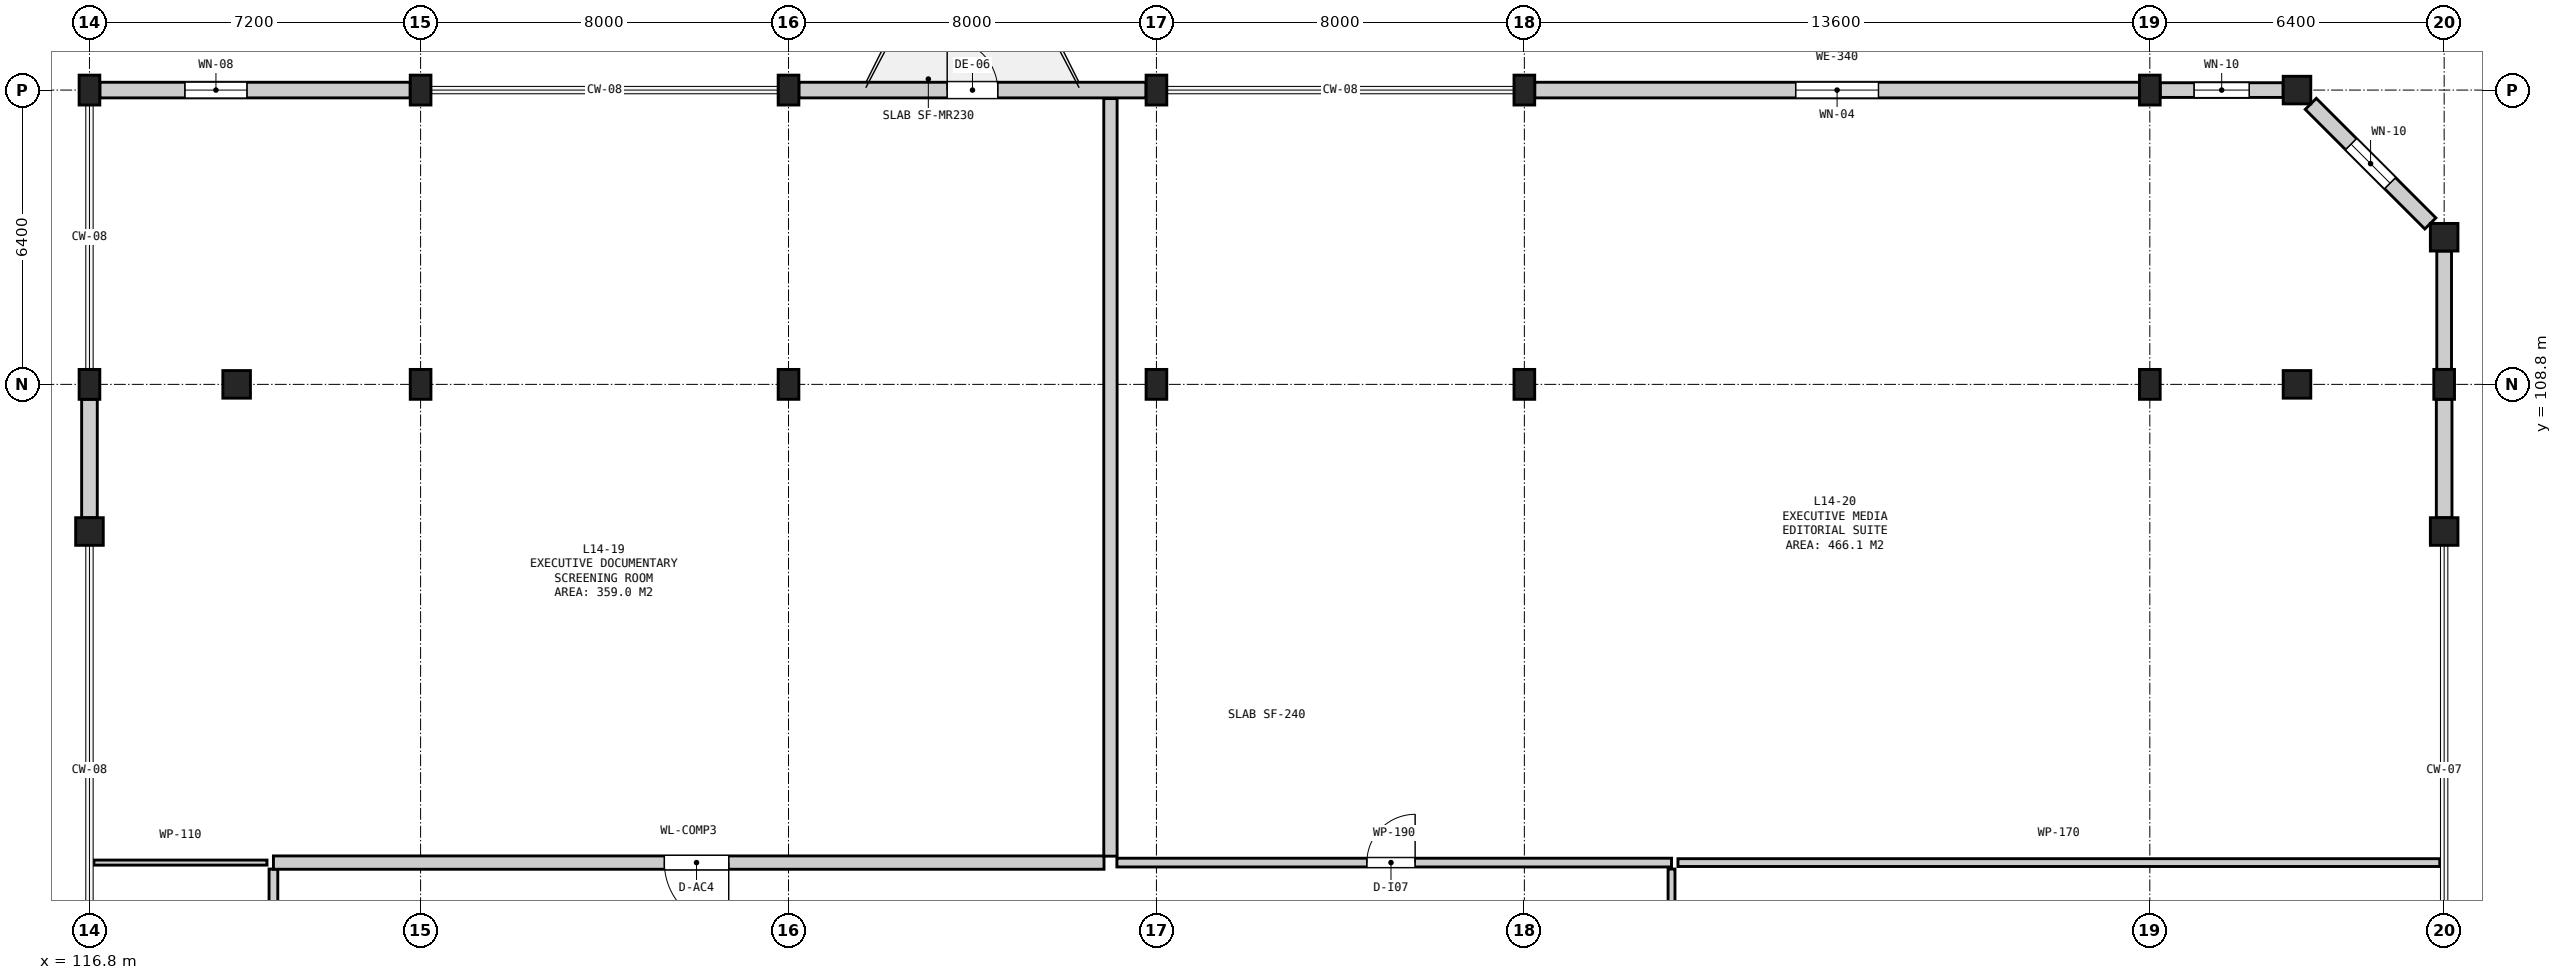
"""IFC4 building model, lengths in metres.
Left out: names, types, materials, properties, quantities, classifications, styles, units other than length and angle.
Written with IfcOpenShell. Run it as: python <this file> out.ifc"""

import sys

from ifc_helpers import new_model, si_unit, direction, frame, frame_2d, origin, origin_2d, place, context, subcontext, project, spatial, rectangle, circle, extrude, element, fill, save


model = new_model("IFC4")
c1 = context("Model", 3, precision=1e-05, world=origin(), true_north=direction((0.0, 1.0)))
c2 = subcontext(c1, "Body", "Model", "MODEL_VIEW")
j1 = project(units=[si_unit("LENGTHUNIT", "METRE"), si_unit("PLANEANGLEUNIT", "RADIAN")], contexts=[c1])
p1 = place(None, origin())
s1 = spatial("IfcSite", under=j1, at=p1, CompositionType="ELEMENT")
p2 = place(p1, origin())
s2 = spatial("IfcBuilding", under=s1, at=p2, CompositionType="ELEMENT")
p3 = place(p2, frame((0.0, 0.0, 58.7)))
s3 = spatial("IfcBuildingStorey", under=s2, at=p3, CompositionType="ELEMENT", Elevation=58.7)
p4 = place(p3, frame((116.8, 105.6, 0.0), z_axis=(0.0, 0.0, 1.0), x_axis=(1.0, 0.0, 0.0)))
e1 = element("IfcColumn", 1, at=p4, inside=s3, PredefinedType="COLUMN", context=c2, shape_type="SweptSolid", body=[
    extrude(circle(Radius=0.3, at=origin_2d()), origin(), (0.0, 0.0, 1.0), 3.95),
])
for number, where, z_axis, x_axis in (
    (2, (116.8, 108.8, 0.0), (0.0, 0.0, 1.0), (1.0, 0.0, 0.0)),
    (3, (116.8, 115.2, 0.0), (0.0, 0.0, 1.0), (1.0, 0.0, 0.0)),
):
    element("IfcColumn", number, at=place(p3, frame(where, z_axis=z_axis, x_axis=x_axis)), inside=s3, PredefinedType="COLUMN", context=c2, shape_type="SweptSolid", body=[
        extrude(rectangle(XDim=0.45, YDim=0.65, at=origin_2d()), origin(), (0.0, 0.0, 1.0), 3.95),
    ])
p5 = place(p3, frame((120.0, 108.8, 0.0), z_axis=(0.0, 0.0, 1.0), x_axis=(1.0, 0.0, 0.0)))
e4 = element("IfcColumn", 4, at=p5, inside=s3, PredefinedType="COLUMN", context=c2, shape_type="SweptSolid", body=[
    extrude(circle(Radius=0.3, at=origin_2d()), origin(), (0.0, 0.0, 1.0), 3.95),
])
for number, where, z_axis, x_axis in (
    (5, (124.0, 108.8, 0.0), (0.0, 0.0, 1.0), (1.0, 0.0, 0.0)),
    (6, (124.0, 115.2, 0.0), (0.0, 0.0, 1.0), (1.0, 0.0, 0.0)),
    (7, (132.0, 108.8, 0.0), (0.0, 0.0, 1.0), (1.0, 0.0, 0.0)),
    (8, (132.0, 115.2, 0.0), (0.0, 0.0, 1.0), (1.0, 0.0, 0.0)),
    (9, (140.0, 108.8, 0.0), (0.0, 0.0, 1.0), (1.0, 0.0, 0.0)),
    (10, (140.0, 115.2, 0.0), (0.0, 0.0, 1.0), (1.0, 0.0, 0.0)),
    (11, (148.0, 108.8, 0.0), (0.0, 0.0, 1.0), (1.0, 0.0, 0.0)),
    (12, (148.0, 115.2, 0.0), (0.0, 0.0, 1.0), (1.0, 0.0, 0.0)),
    (13, (161.6, 108.8, 0.0), (0.0, 0.0, 1.0), (1.0, 0.0, 0.0)),
    (14, (161.6, 115.2, 0.0), (0.0, 0.0, 1.0), (1.0, 0.0, 0.0)),
):
    element("IfcColumn", number, at=place(p3, frame(where, z_axis=z_axis, x_axis=x_axis)), inside=s3, PredefinedType="COLUMN", context=c2, shape_type="SweptSolid", body=[
        extrude(rectangle(XDim=0.45, YDim=0.65, at=origin_2d()), origin(), (0.0, 0.0, 1.0), 3.95),
    ])
for number, where, z_axis, x_axis in (
    (15, (164.8, 108.8, 0.0), (0.0, 0.0, 1.0), (1.0, 0.0, 0.0)),
    (16, (164.8, 115.2, 0.0), (0.0, 0.0, 1.0), (1.0, 0.0, 0.0)),
    (17, (168.0, 105.6, 0.0), (0.0, 0.0, 1.0), (1.0, 0.0, 0.0)),
):
    element("IfcColumn", number, at=place(p3, frame(where, z_axis=z_axis, x_axis=x_axis)), inside=s3, PredefinedType="COLUMN", context=c2, shape_type="SweptSolid", body=[
        extrude(circle(Radius=0.3, at=origin_2d()), origin(), (0.0, 0.0, 1.0), 3.95),
    ])
p6 = place(p3, frame((168.0, 108.8, 0.0), z_axis=(0.0, 0.0, 1.0), x_axis=(1.0, 0.0, 0.0)))
e18 = element("IfcColumn", 18, at=p6, inside=s3, PredefinedType="COLUMN", context=c2, shape_type="SweptSolid", body=[
    extrude(rectangle(XDim=0.45, YDim=0.65, at=origin_2d()), origin(), (0.0, 0.0, 1.0), 3.95),
])
p7 = place(p3, frame((168.0, 112.0, 0.0), z_axis=(0.0, 0.0, 1.0), x_axis=(1.0, 0.0, 0.0)))
e19 = element("IfcColumn", 19, at=p7, inside=s3, PredefinedType="COLUMN", context=c2, shape_type="SweptSolid", body=[
    extrude(circle(Radius=0.3, at=origin_2d()), origin(), (0.0, 0.0, 1.0), 3.95),
])
p8 = place(p3, frame((168.0, 105.9, 0.0), z_axis=(0.0, 0.0, 1.0), x_axis=(0.0, 1.0, 0.0)))
e20 = element("IfcWall", 20, at=p8, inside=s3, PredefinedType="SOLIDWALL", context=c2, shape_type="SweptSolid", body=[
    extrude(rectangle(XDim=2.575, YDim=0.34, at=frame_2d((1.288, 0.0))), origin(), (0.0, 0.0, 1.0), 2.635),
])
p9 = place(p3, frame((168.0, 109.125, 0.0), z_axis=(0.0, 0.0, 1.0), x_axis=(0.0, 1.0, 0.0)))
e21 = element("IfcWall", 21, at=p9, inside=s3, PredefinedType="SOLIDWALL", context=c2, shape_type="SweptSolid", body=[
    extrude(rectangle(XDim=2.575, YDim=0.32, at=frame_2d((1.288, 0.0))), origin(), (0.0, 0.0, 1.0), 3.05),
])
p10 = place(p3, frame((167.7, 112.3, 0.0), z_axis=(0.0, 0.0, 1.0), x_axis=(-0.707106781187, 0.707106781187, 0.0)))
e22 = element("IfcWall", 22, at=p10, inside=s3, PredefinedType="SOLIDWALL", context=c2, shape_type="SweptSolid", body=[
    extrude(rectangle(XDim=3.677, YDim=0.34, at=frame_2d((1.838, 0.0))), origin(), (0.0, 0.0, 1.0), 3.045),
])
p11 = place(p10, frame((1.239, 0.0, 0.9)))
e23 = element("IfcOpeningElement", 23, at=p11, cuts=e22, PredefinedType="OPENING", context=c2, shape_type="SweptSolid", body=[
    extrude(rectangle(XDim=1.2, YDim=1.7, at=frame_2d((0.6, 0.85))), frame((0.0, 0.182, 0.0), z_axis=(0.0, -1.0, 0.0), x_axis=(1.0, 0.0, 0.0)), (0.0, 0.0, 1.0), 0.364),
])
p12 = place(p3, frame((164.5, 115.2, 0.0), z_axis=(0.0, 0.0, 1.0), x_axis=(-1.0, 0.0, 0.0)))
e24 = element("IfcWall", 24, at=p12, inside=s3, PredefinedType="SOLIDWALL", context=c2, shape_type="SweptSolid", body=[
    extrude(rectangle(XDim=2.675, YDim=0.32, at=frame_2d((1.337, 0.0))), origin(), (0.0, 0.0, 1.0), 3.05),
])
p13 = place(p12, frame((0.738, 0.0, 0.9)))
e25 = element("IfcOpeningElement", 25, at=p13, cuts=e24, PredefinedType="OPENING", context=c2, shape_type="SweptSolid", body=[
    extrude(rectangle(XDim=1.2, YDim=1.7, at=frame_2d((0.6, 0.85))), frame((0.0, 0.172, 0.0), z_axis=(0.0, -1.0, 0.0), x_axis=(1.0, 0.0, 0.0)), (0.0, 0.0, 1.0), 0.344),
])
p14 = place(p3, frame((161.375, 115.2, 0.0), z_axis=(0.0, 0.0, 1.0), x_axis=(-1.0, 0.0, 0.0)))
e26 = element("IfcWall", 26, at=p14, inside=s3, PredefinedType="SOLIDWALL", context=c2, shape_type="SweptSolid", body=[
    extrude(rectangle(XDim=13.15, YDim=0.34, at=frame_2d((6.575, 0.0))), origin(), (0.0, 0.0, 1.0), 3.035),
])
p15 = place(p14, frame((5.675, 0.0, 0.9)))
e27 = element("IfcOpeningElement", 27, at=p15, cuts=e26, PredefinedType="OPENING", context=c2, shape_type="SweptSolid", body=[
    extrude(rectangle(XDim=1.8, YDim=1.85, at=frame_2d((0.9, 0.925))), frame((0.0, 0.182, 0.0), z_axis=(0.0, -1.0, 0.0), x_axis=(1.0, 0.0, 0.0)), (0.0, 0.0, 1.0), 0.364),
])
p16 = place(p3, frame((139.775, 115.2, 0.0), z_axis=(0.0, 0.0, 1.0), x_axis=(-1.0, 0.0, 0.0)))
e28 = element("IfcWall", 28, at=p16, inside=s3, PredefinedType="SOLIDWALL", context=c2, shape_type="SweptSolid", body=[
    extrude(rectangle(XDim=7.55, YDim=0.34, at=frame_2d((3.775, 0.0))), origin(), (0.0, 0.0, 1.0), 3.05),
])
p17 = place(p16, frame((3.225, 0.0, 0.0)))
e29 = element("IfcOpeningElement", 29, at=p17, cuts=e28, PredefinedType="OPENING", context=c2, shape_type="SweptSolid", body=[
    extrude(rectangle(XDim=1.1, YDim=2.2, at=frame_2d((0.55, 1.1))), frame((0.0, 0.182, 0.0), z_axis=(0.0, -1.0, 0.0), x_axis=(1.0, 0.0, 0.0)), (0.0, 0.0, 1.0), 0.364),
])
p18 = place(p3, frame((123.775, 115.2, 0.0), z_axis=(0.0, 0.0, 1.0), x_axis=(-1.0, 0.0, 0.0)))
e30 = element("IfcWall", 30, at=p18, inside=s3, PredefinedType="SOLIDWALL", context=c2, shape_type="SweptSolid", body=[
    extrude(rectangle(XDim=6.75, YDim=0.34, at=frame_2d((3.375, 0.0))), origin(), (0.0, 0.0, 1.0), 3.035),
])
p19 = place(p18, frame((3.55, 0.0, 0.9)))
e31 = element("IfcOpeningElement", 31, at=p19, cuts=e30, PredefinedType="OPENING", context=c2, shape_type="SweptSolid", body=[
    extrude(rectangle(XDim=1.35, YDim=1.75, at=frame_2d((0.675, 0.875))), frame((0.0, 0.182, 0.0), z_axis=(0.0, -1.0, 0.0), x_axis=(1.0, 0.0, 0.0)), (0.0, 0.0, 1.0), 0.364),
])
p20 = place(p3, frame((116.8, 108.475, 0.0), z_axis=(0.0, 0.0, 1.0), x_axis=(0.0, -1.0, 0.0)))
e32 = element("IfcWall", 32, at=p20, inside=s3, PredefinedType="SOLIDWALL", context=c2, shape_type="SweptSolid", body=[
    extrude(rectangle(XDim=2.575, YDim=0.34, at=frame_2d((1.288, 0.0))), origin(), (0.0, 0.0, 1.0), 2.635),
])
p21 = place(p3, frame((151.34, 98.4, 0.0), z_axis=(0.0, 0.0, 1.0), x_axis=(1.0, 0.0, 0.0)))
e33 = element("IfcWall", 33, at=p21, inside=s3, PredefinedType="PARTITIONING", context=c2, shape_type="SweptSolid", body=[
    extrude(rectangle(XDim=16.565, YDim=0.17, at=frame_2d((8.282, 0.0))), origin(), (0.0, 0.0, 1.0), 3.67),
])
p22 = place(p3, frame((151.2, 76.0, 0.0), z_axis=(0.0, 0.0, 1.0), x_axis=(0.0, 1.0, 0.0)))
e34 = element("IfcWall", 34, at=p22, inside=s3, PredefinedType="PARTITIONING", context=c2, shape_type="SweptSolid", body=[
    extrude(rectangle(XDim=22.26, YDim=0.15, at=frame_2d((11.13, 0.0))), origin(), (0.0, 0.0, 1.0), 3.67),
])
p23 = place(p22, frame((6.675, 0.0, 0.0)))
e35 = element("IfcOpeningElement", 35, at=p23, cuts=e34, PredefinedType="OPENING", context=c2, shape_type="SweptSolid", body=[
    extrude(rectangle(XDim=1.05, YDim=2.15, at=frame_2d((0.525, 1.075))), frame((0.0, 0.087, 0.0), z_axis=(0.0, -1.0, 0.0), x_axis=(1.0, 0.0, 0.0)), (0.0, 0.0, 1.0), 0.174),
])
p24 = place(p3, frame((116.895, 98.4, 0.0), z_axis=(0.0, 0.0, 1.0), x_axis=(1.0, 0.0, 0.0)))
e36 = element("IfcWall", 36, at=p24, inside=s3, PredefinedType="PARTITIONING", context=c2, shape_type="SweptSolid", body=[
    extrude(rectangle(XDim=3.765, YDim=0.11, at=frame_2d((1.882, 0.0))), origin(), (0.0, 0.0, 1.0), 3.67),
])
p25 = place(p3, frame((120.8, 76.14, 0.0), z_axis=(0.0, 0.0, 1.0), x_axis=(0.0, 1.0, 0.0)))
e37 = element("IfcWall", 37, at=p25, inside=s3, PredefinedType="PARTITIONING", context=c2, shape_type="SweptSolid", body=[
    extrude(rectangle(XDim=22.12, YDim=0.19, at=frame_2d((11.06, 0.0))), origin(), (0.0, 0.0, 1.0), 3.67),
])
p26 = place(p25, frame((6.535, 0.0, 0.0)))
e38 = element("IfcOpeningElement", 38, at=p26, cuts=e37, PredefinedType="OPENING", context=c2, shape_type="SweptSolid", body=[
    extrude(rectangle(XDim=1.05, YDim=2.15, at=frame_2d((0.525, 1.075))), frame((0.0, 0.107, 0.0), z_axis=(0.0, -1.0, 0.0), x_axis=(1.0, 0.0, 0.0)), (0.0, 0.0, 1.0), 0.214),
])
p27 = place(p3, frame((120.8, 98.4, 0.0), z_axis=(0.0, 0.0, 1.0), x_axis=(1.0, 0.0, 0.0)))
e39 = element("IfcWall", 39, at=p27, inside=s3, PredefinedType="SOLIDWALL", context=c2, shape_type="SweptSolid", body=[
    extrude(rectangle(XDim=18.06, YDim=0.29, at=frame_2d((9.03, 0.0))), origin(), (0.0, 0.0, 1.0), 3.67),
])
p28 = place(p27, frame((8.5, 0.0, 0.0)))
e40 = element("IfcOpeningElement", 40, at=p28, cuts=e39, PredefinedType="OPENING", context=c2, shape_type="SweptSolid", body=[
    extrude(rectangle(XDim=1.4, YDim=2.2, at=frame_2d((0.7, 1.1))), frame((0.0, 0.157, 0.0), z_axis=(0.0, -1.0, 0.0), x_axis=(1.0, 0.0, 0.0)), (0.0, 0.0, 1.0), 0.314),
])
p29 = place(p3, frame((139.0, 98.54, 0.0), z_axis=(0.0, 0.0, 1.0), x_axis=(0.0, 1.0, 0.0)))
e41 = element("IfcWall", 41, at=p29, inside=s3, PredefinedType="SOLIDWALL", context=c2, shape_type="SweptSolid", body=[
    extrude(rectangle(XDim=16.475, YDim=0.29, at=frame_2d((8.237, 0.0))), origin(), (0.0, 0.0, 1.0), 3.67),
])
p30 = place(p3, frame((139.14, 98.4, 0.0), z_axis=(0.0, 0.0, 1.0), x_axis=(1.0, 0.0, 0.0)))
e42 = element("IfcWall", 42, at=p30, inside=s3, PredefinedType="PARTITIONING", context=c2, shape_type="SweptSolid", body=[
    extrude(rectangle(XDim=12.06, YDim=0.19, at=frame_2d((6.03, 0.0))), origin(), (0.0, 0.0, 1.0), 3.67),
])
p31 = place(p30, frame((5.435, 0.0, 0.0)))
e43 = element("IfcOpeningElement", 43, at=p31, cuts=e42, PredefinedType="OPENING", context=c2, shape_type="SweptSolid", body=[
    extrude(rectangle(XDim=1.05, YDim=2.15, at=frame_2d((0.525, 1.075))), frame((0.0, 0.107, 0.0), z_axis=(0.0, -1.0, 0.0), x_axis=(1.0, 0.0, 0.0)), (0.0, 0.0, 1.0), 0.214),
])
p32 = place(p11, origin())
e44 = element("IfcWindow", 44, at=p32, inside=s3, PartitioningType="SINGLE_PANEL", PredefinedType="WINDOW", context=c2, shape_type="SweptSolid", body=[
    extrude(rectangle(XDim=1.2, YDim=1.7, at=frame_2d((0.6, 0.85))), frame((0.0, 0.03, 0.0), z_axis=(0.0, -1.0, 0.0), x_axis=(1.0, 0.0, 0.0)), (0.0, 0.0, 1.0), 0.06),
])
fill(e23, e44)
p33 = place(p13, origin())
e45 = element("IfcWindow", 45, at=p33, inside=s3, PartitioningType="SINGLE_PANEL", PredefinedType="WINDOW", context=c2, shape_type="SweptSolid", body=[
    extrude(rectangle(XDim=1.2, YDim=1.7, at=frame_2d((0.6, 0.85))), frame((0.0, 0.03, 0.0), z_axis=(0.0, -1.0, 0.0), x_axis=(1.0, 0.0, 0.0)), (0.0, 0.0, 1.0), 0.06),
])
fill(e25, e45)
p34 = place(p15, origin())
e46 = element("IfcWindow", 46, at=p34, inside=s3, PartitioningType="DOUBLE_PANEL_VERTICAL", PredefinedType="WINDOW", context=c2, shape_type="SweptSolid", body=[
    extrude(rectangle(XDim=1.8, YDim=1.85, at=frame_2d((0.9, 0.925))), frame((0.0, 0.03, 0.0), z_axis=(0.0, -1.0, 0.0), x_axis=(1.0, 0.0, 0.0)), (0.0, 0.0, 1.0), 0.06),
])
fill(e27, e46)
p35 = place(p17, frame((1.1, 0.0, 0.0), z_axis=(0.0, 0.0, 1.0), x_axis=(-1.0, 0.0, 0.0)))
e47 = element("IfcDoor", 47, at=p35, inside=s3, OperationType="SINGLE_SWING_LEFT", PredefinedType="DOOR", context=c2, shape_type="SweptSolid", body=[
    extrude(rectangle(XDim=1.1, YDim=2.2, at=frame_2d((0.55, 1.1))), frame((0.0, 0.025, 0.0), z_axis=(0.0, -1.0, 0.0), x_axis=(1.0, 0.0, 0.0)), (0.0, 0.0, 1.0), 0.05),
])
fill(e29, e47)
p36 = place(p19, origin())
e48 = element("IfcWindow", 48, at=p36, inside=s3, PartitioningType="SINGLE_PANEL", PredefinedType="WINDOW", context=c2, shape_type="SweptSolid", body=[
    extrude(rectangle(XDim=1.35, YDim=1.75, at=frame_2d((0.675, 0.875))), frame((0.0, 0.03, 0.0), z_axis=(0.0, -1.0, 0.0), x_axis=(1.0, 0.0, 0.0)), (0.0, 0.0, 1.0), 0.06),
])
fill(e31, e48)
p37 = place(p28, frame((1.4, 0.0, 0.0), z_axis=(0.0, 0.0, 1.0), x_axis=(-1.0, 0.0, 0.0)))
e49 = element("IfcDoor", 49, at=p37, inside=s3, OperationType="SINGLE_SWING_LEFT", PredefinedType="DOOR", context=c2, shape_type="SweptSolid", body=[
    extrude(rectangle(XDim=1.4, YDim=2.2, at=frame_2d((0.7, 1.1))), frame((0.0, 0.025, 0.0), z_axis=(0.0, -1.0, 0.0), x_axis=(1.0, 0.0, 0.0)), (0.0, 0.0, 1.0), 0.05),
])
fill(e40, e49)
p38 = place(p31, origin())
e50 = element("IfcDoor", 50, at=p38, inside=s3, OperationType="SINGLE_SWING_RIGHT", PredefinedType="DOOR", context=c2, shape_type="SweptSolid", body=[
    extrude(rectangle(XDim=1.05, YDim=2.15, at=frame_2d((0.525, 1.075))), frame((0.0, 0.025, 0.0), z_axis=(0.0, -1.0, 0.0), x_axis=(1.0, 0.0, 0.0)), (0.0, 0.0, 1.0), 0.05),
])
fill(e43, e50)
save(model, sys.argv[1])
